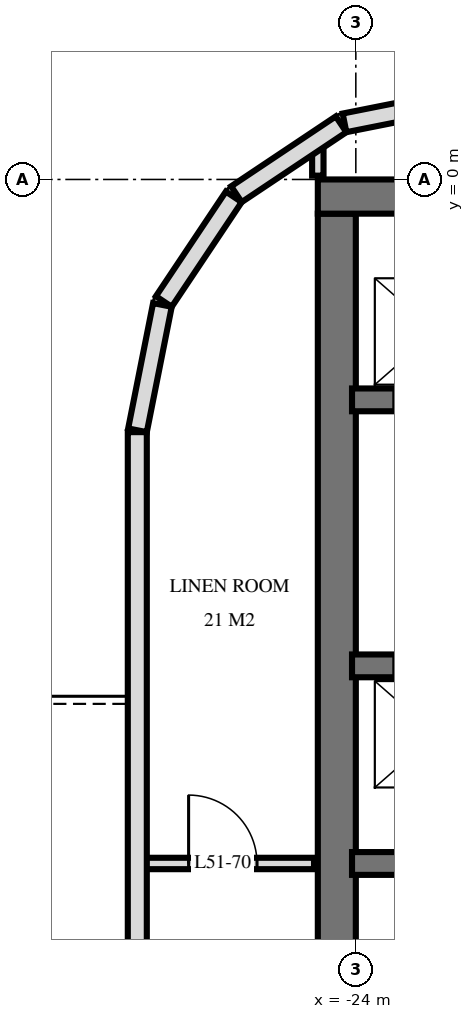
"""IFC4 building model, lengths in metres.
Left out: names, types, materials, properties, quantities, classifications, styles, units other than length and angle.
Written with IfcOpenShell. Run it as: python <this file> out.ifc"""

import sys

from ifc_helpers import new_model, si_unit, direction, frame, frame_2d, origin, place, context, subcontext, project, spatial, rectangle, extrude, element, fill, save


model = new_model("IFC4")
c1 = context("Model", 3, precision=1e-05, world=origin(), true_north=direction((0.0, 1.0)))
c2 = subcontext(c1, "Body", "Model", "MODEL_VIEW")
j1 = project(units=[si_unit("LENGTHUNIT", "METRE"), si_unit("PLANEANGLEUNIT", "RADIAN")], contexts=[c1])
p1 = place(None, origin())
s1 = spatial("IfcSite", under=j1, at=p1, CompositionType="ELEMENT")
p2 = place(p1, origin())
s2 = spatial("IfcBuilding", under=s1, at=p2, CompositionType="ELEMENT")
p3 = place(p2, frame((0.0, 0.0, 197.6)))
s3 = spatial("IfcBuildingStorey", under=s2, at=p3, CompositionType="ELEMENT", Elevation=197.6)
p4 = place(p3, frame((-24.5, -0.225, 0.0), z_axis=(0.0, 0.0, 1.0), x_axis=(1.0, 0.0, 0.0)))
e1 = element("IfcWall", 1, at=p4, inside=s3, PredefinedType="SHEAR", context=c2, shape_type="SweptSolid", body=[
    extrude(rectangle(XDim=14.5, YDim=0.45, at=frame_2d((7.25, 0.0))), origin(), (0.0, 0.0, 1.0), 3.5),
])
p5 = place(p3, frame((-24.25, -14.55, 0.0), z_axis=(0.0, 0.0, 1.0), x_axis=(0.0, 1.0, 0.0)))
e2 = element("IfcWall", 2, at=p5, inside=s3, PredefinedType="SHEAR", context=c2, shape_type="SweptSolid", body=[
    extrude(rectangle(XDim=14.1, YDim=0.5, at=frame_2d((7.05, 0.0))), origin(), (0.0, 0.0, 1.0), 3.5),
])
p6 = place(p3, frame((-24.05, -2.9, 0.0), z_axis=(0.0, 0.0, 1.0), x_axis=(1.0, 0.0, 0.0)))
e3 = element("IfcWall", 3, at=p6, inside=s3, PredefinedType="SHEAR", context=c2, shape_type="SweptSolid", body=[
    extrude(rectangle(XDim=13.7, YDim=0.3, at=frame_2d((6.85, 0.0))), origin(), (0.0, 0.0, 1.0), 3.5),
])
p7 = place(p6, frame((0.55, 0.0, 0.0)))
e4 = element("IfcOpeningElement", 4, at=p7, cuts=e3, PredefinedType="OPENING", context=c2, shape_type="SweptSolid", body=[
    extrude(rectangle(XDim=1.1, YDim=2.1, at=frame_2d((0.55, 1.05))), frame((0.0, 0.16, 0.0), z_axis=(0.0, -1.0, 0.0), x_axis=(1.0, 0.0, 0.0)), (0.0, 0.0, 1.0), 0.32),
])
p8 = place(p6, frame((6.613, 0.0, 0.0)))
e5 = element("IfcOpeningElement", 5, at=p8, cuts=e3, PredefinedType="OPENING", context=c2, shape_type="SweptSolid", body=[
    extrude(rectangle(XDim=0.9, YDim=2.1, at=frame_2d((0.45, 1.05))), frame((0.0, 0.16, 0.0), z_axis=(0.0, -1.0, 0.0), x_axis=(1.0, 0.0, 0.0)), (0.0, 0.0, 1.0), 0.32),
])
p9 = place(p6, frame((5.188, 0.0, 0.0)))
e6 = element("IfcOpeningElement", 6, at=p9, cuts=e3, PredefinedType="OPENING", context=c2, shape_type="SweptSolid", body=[
    extrude(rectangle(XDim=0.9, YDim=2.1, at=frame_2d((0.45, 1.05))), frame((0.0, 0.16, 0.0), z_axis=(0.0, -1.0, 0.0), x_axis=(1.0, 0.0, 0.0)), (0.0, 0.0, 1.0), 0.32),
])
p10 = place(p6, frame((12.562, 0.0, 0.0)))
e7 = element("IfcOpeningElement", 7, at=p10, cuts=e3, PredefinedType="OPENING", context=c2, shape_type="SweptSolid", body=[
    extrude(rectangle(XDim=1.0, YDim=2.1, at=frame_2d((0.5, 1.05))), frame((0.0, 0.16, 0.0), z_axis=(0.0, -1.0, 0.0), x_axis=(1.0, 0.0, 0.0)), (0.0, 0.0, 1.0), 0.32),
])
p11 = place(p6, frame((11.137, 0.0, 0.0)))
e8 = element("IfcOpeningElement", 8, at=p11, cuts=e3, PredefinedType="OPENING", context=c2, shape_type="SweptSolid", body=[
    extrude(rectangle(XDim=1.0, YDim=2.1, at=frame_2d((0.5, 1.05))), frame((0.0, 0.16, 0.0), z_axis=(0.0, -1.0, 0.0), x_axis=(1.0, 0.0, 0.0)), (0.0, 0.0, 1.0), 0.32),
])
p12 = place(p6, frame((8.85, 0.0, 0.0)))
e9 = element("IfcOpeningElement", 9, at=p12, cuts=e3, PredefinedType="OPENING", context=c2, shape_type="SweptSolid", body=[
    extrude(rectangle(XDim=1.0, YDim=2.1, at=frame_2d((0.5, 1.05))), frame((0.0, 0.16, 0.0), z_axis=(0.0, -1.0, 0.0), x_axis=(1.0, 0.0, 0.0)), (0.0, 0.0, 1.0), 0.32),
])
p13 = place(p6, frame((3.0, 0.0, 0.0)))
e10 = element("IfcOpeningElement", 10, at=p13, cuts=e3, PredefinedType="OPENING", context=c2, shape_type="SweptSolid", body=[
    extrude(rectangle(XDim=1.0, YDim=2.1, at=frame_2d((0.5, 1.05))), frame((0.0, 0.16, 0.0), z_axis=(0.0, -1.0, 0.0), x_axis=(1.0, 0.0, 0.0)), (0.0, 0.0, 1.0), 0.32),
])
p14 = place(p3, frame((-24.05, -6.4, 0.0), z_axis=(0.0, 0.0, 1.0), x_axis=(1.0, 0.0, 0.0)))
e11 = element("IfcWall", 11, at=p14, inside=s3, PredefinedType="SHEAR", context=c2, shape_type="SweptSolid", body=[
    extrude(rectangle(XDim=13.7, YDim=0.3, at=frame_2d((6.85, 0.0))), origin(), (0.0, 0.0, 1.0), 3.5),
])
p15 = place(p14, frame((0.55, 0.0, 0.0)))
e12 = element("IfcOpeningElement", 12, at=p15, cuts=e11, PredefinedType="OPENING", context=c2, shape_type="SweptSolid", body=[
    extrude(rectangle(XDim=1.1, YDim=2.1, at=frame_2d((0.55, 1.05))), frame((0.0, 0.16, 0.0), z_axis=(0.0, -1.0, 0.0), x_axis=(1.0, 0.0, 0.0)), (0.0, 0.0, 1.0), 0.32),
])
p16 = place(p14, frame((5.8, 0.0, 0.0)))
e13 = element("IfcOpeningElement", 13, at=p16, cuts=e11, PredefinedType="OPENING", context=c2, shape_type="SweptSolid", body=[
    extrude(rectangle(XDim=1.1, YDim=2.1, at=frame_2d((0.55, 1.05))), frame((0.0, 0.16, 0.0), z_axis=(0.0, -1.0, 0.0), x_axis=(1.0, 0.0, 0.0)), (0.0, 0.0, 1.0), 0.32),
])
p17 = place(p3, frame((-24.05, -9.0, 0.0), z_axis=(0.0, 0.0, 1.0), x_axis=(1.0, 0.0, 0.0)))
e14 = element("IfcWall", 14, at=p17, inside=s3, PredefinedType="SHEAR", context=c2, shape_type="SweptSolid", body=[
    extrude(rectangle(XDim=13.7, YDim=0.3, at=frame_2d((6.85, 0.0))), origin(), (0.0, 0.0, 1.0), 3.5),
])
p18 = place(p17, frame((8.8, 0.0, 0.0)))
e15 = element("IfcOpeningElement", 15, at=p18, cuts=e14, PredefinedType="OPENING", context=c2, shape_type="SweptSolid", body=[
    extrude(rectangle(XDim=1.1, YDim=2.1, at=frame_2d((0.55, 1.05))), frame((0.0, 0.16, 0.0), z_axis=(0.0, -1.0, 0.0), x_axis=(1.0, 0.0, 0.0)), (0.0, 0.0, 1.0), 0.32),
])
p19 = place(p3, frame((-22.5, 1.073, 0.0), z_axis=(0.0, 0.0, 1.0), x_axis=(-0.980803419081, -0.194999110559, 0.0)))
e16 = element("IfcWall", 16, at=p19, inside=s3, PredefinedType="SOLIDWALL", context=c2, shape_type="SweptSolid", body=[
    extrude(rectangle(XDim=1.681, YDim=0.25, at=frame_2d((0.841, 0.0))), origin(), (0.0, 0.0, 1.0), 3.22),
])
for number, where, z_axis, x_axis in (
    (17, (-24.194, 0.726, 0.0), (0.0, 0.0, 1.0), (-0.831, -0.556, 0.0)),
    (18, (-25.606, -0.229, 0.0), (0.0, 0.0, 1.0), (-0.556, -0.831, 0.0)),
):
    element("IfcWall", number, at=place(p3, frame(where, z_axis=z_axis, x_axis=x_axis)), inside=s3, PredefinedType="SOLIDWALL", context=c2, shape_type="SweptSolid", body=[
        extrude(rectangle(XDim=1.656, YDim=0.25, at=frame_2d((0.828, 0.0))), origin(), (0.0, 0.0, 1.0), 3.22),
    ])
p20 = place(p3, frame((-26.545, -1.651, 0.0), z_axis=(0.0, 0.0, 1.0), x_axis=(-0.194999110559, -0.980803419081, 0.0)))
e19 = element("IfcWall", 19, at=p20, inside=s3, PredefinedType="SOLIDWALL", context=c2, shape_type="SweptSolid", body=[
    extrude(rectangle(XDim=1.681, YDim=0.25, at=frame_2d((0.841, 0.0))), origin(), (0.0, 0.0, 1.0), 3.22),
])
p21 = place(p3, frame((-26.875, -3.325, 0.0), z_axis=(0.0, 0.0, 1.0), x_axis=(0.0, -1.0, 0.0)))
e20 = element("IfcWall", 20, at=p21, inside=s3, PredefinedType="SOLIDWALL", context=c2, shape_type="SweptSolid", body=[
    extrude(rectangle(XDim=21.551, YDim=0.25, at=frame_2d((10.775, 0.0))), origin(), (0.0, 0.0, 1.0), 3.22),
])
p22 = place(p21, frame((7.775, 0.0, 0.0)))
e21 = element("IfcOpeningElement", 21, at=p22, cuts=e20, PredefinedType="OPENING", context=c2, shape_type="SweptSolid", body=[
    extrude(rectangle(XDim=1.8, YDim=2.4, at=frame_2d((0.9, 1.2))), frame((0.0, 0.135, 0.0), z_axis=(0.0, -1.0, 0.0), x_axis=(1.0, 0.0, 0.0)), (0.0, 0.0, 1.0), 0.27),
])
p23 = place(p21, frame((12.575, 0.0, 0.9)))
e22 = element("IfcOpeningElement", 22, at=p23, cuts=e20, PredefinedType="OPENING", context=c2, shape_type="SweptSolid", body=[
    extrude(rectangle(XDim=1.2, YDim=1.5, at=frame_2d((0.6, 0.75))), frame((0.0, 0.135, 0.0), z_axis=(0.0, -1.0, 0.0), x_axis=(1.0, 0.0, 0.0)), (0.0, 0.0, 1.0), 0.27),
])
p24 = place(p21, frame((15.275, 0.0, 0.0)))
e23 = element("IfcOpeningElement", 23, at=p24, cuts=e20, PredefinedType="OPENING", context=c2, shape_type="SweptSolid", body=[
    extrude(rectangle(XDim=1.8, YDim=2.4, at=frame_2d((0.9, 1.2))), frame((0.0, 0.135, 0.0), z_axis=(0.0, -1.0, 0.0), x_axis=(1.0, 0.0, 0.0)), (0.0, 0.0, 1.0), 0.27),
])
p25 = place(p21, frame((19.325, 0.0, 0.0)))
e24 = element("IfcOpeningElement", 24, at=p25, cuts=e20, PredefinedType="OPENING", context=c2, shape_type="SweptSolid", body=[
    extrude(rectangle(XDim=1.8, YDim=2.4, at=frame_2d((0.9, 1.2))), frame((0.0, 0.135, 0.0), z_axis=(0.0, -1.0, 0.0), x_axis=(1.0, 0.0, 0.0)), (0.0, 0.0, 1.0), 0.27),
])
p26 = place(p3, frame((-24.5, 0.05, 0.0), z_axis=(0.0, 0.0, 1.0), x_axis=(0.0, 1.0, 0.0)))
e25 = element("IfcWall", 25, at=p26, inside=s3, PredefinedType="PARTITIONING", context=c2, shape_type="SweptSolid", body=[
    extrude(rectangle(XDim=0.405, YDim=0.15, at=frame_2d((0.203, 0.0))), origin(), (0.0, 0.0, 1.0), 3.22),
])
p27 = place(p3, frame((-26.82, -9.0, 0.0), z_axis=(0.0, 0.0, 1.0), x_axis=(1.0, 0.0, 0.0)))
e26 = element("IfcWall", 26, at=p27, inside=s3, PredefinedType="PARTITIONING", context=c2, shape_type="SweptSolid", body=[
    extrude(rectangle(XDim=2.27, YDim=0.15, at=frame_2d((1.135, 0.0))), origin(), (0.0, 0.0, 1.0), 3.22),
])
p28 = place(p27, frame((0.62, 0.0, 0.0)))
e27 = element("IfcOpeningElement", 27, at=p28, cuts=e26, PredefinedType="OPENING", context=c2, shape_type="SweptSolid", body=[
    extrude(rectangle(XDim=0.9, YDim=2.1, at=frame_2d((0.45, 1.05))), frame((0.0, 0.085, 0.0), z_axis=(0.0, -1.0, 0.0), x_axis=(1.0, 0.0, 0.0)), (0.0, 0.0, 1.0), 0.17),
])
p29 = place(p28, origin())
e28 = element("IfcDoor", 28, at=p29, inside=s3, OperationType="SINGLE_SWING_RIGHT", PredefinedType="DOOR", context=c2, shape_type="SweptSolid", body=[
    extrude(rectangle(XDim=0.9, YDim=2.1, at=frame_2d((0.45, 1.05))), frame((0.0, 0.025, 0.0), z_axis=(0.0, -1.0, 0.0), x_axis=(1.0, 0.0, 0.0)), (0.0, 0.0, 1.0), 0.05),
])
fill(e27, e28)
save(model, sys.argv[1])
